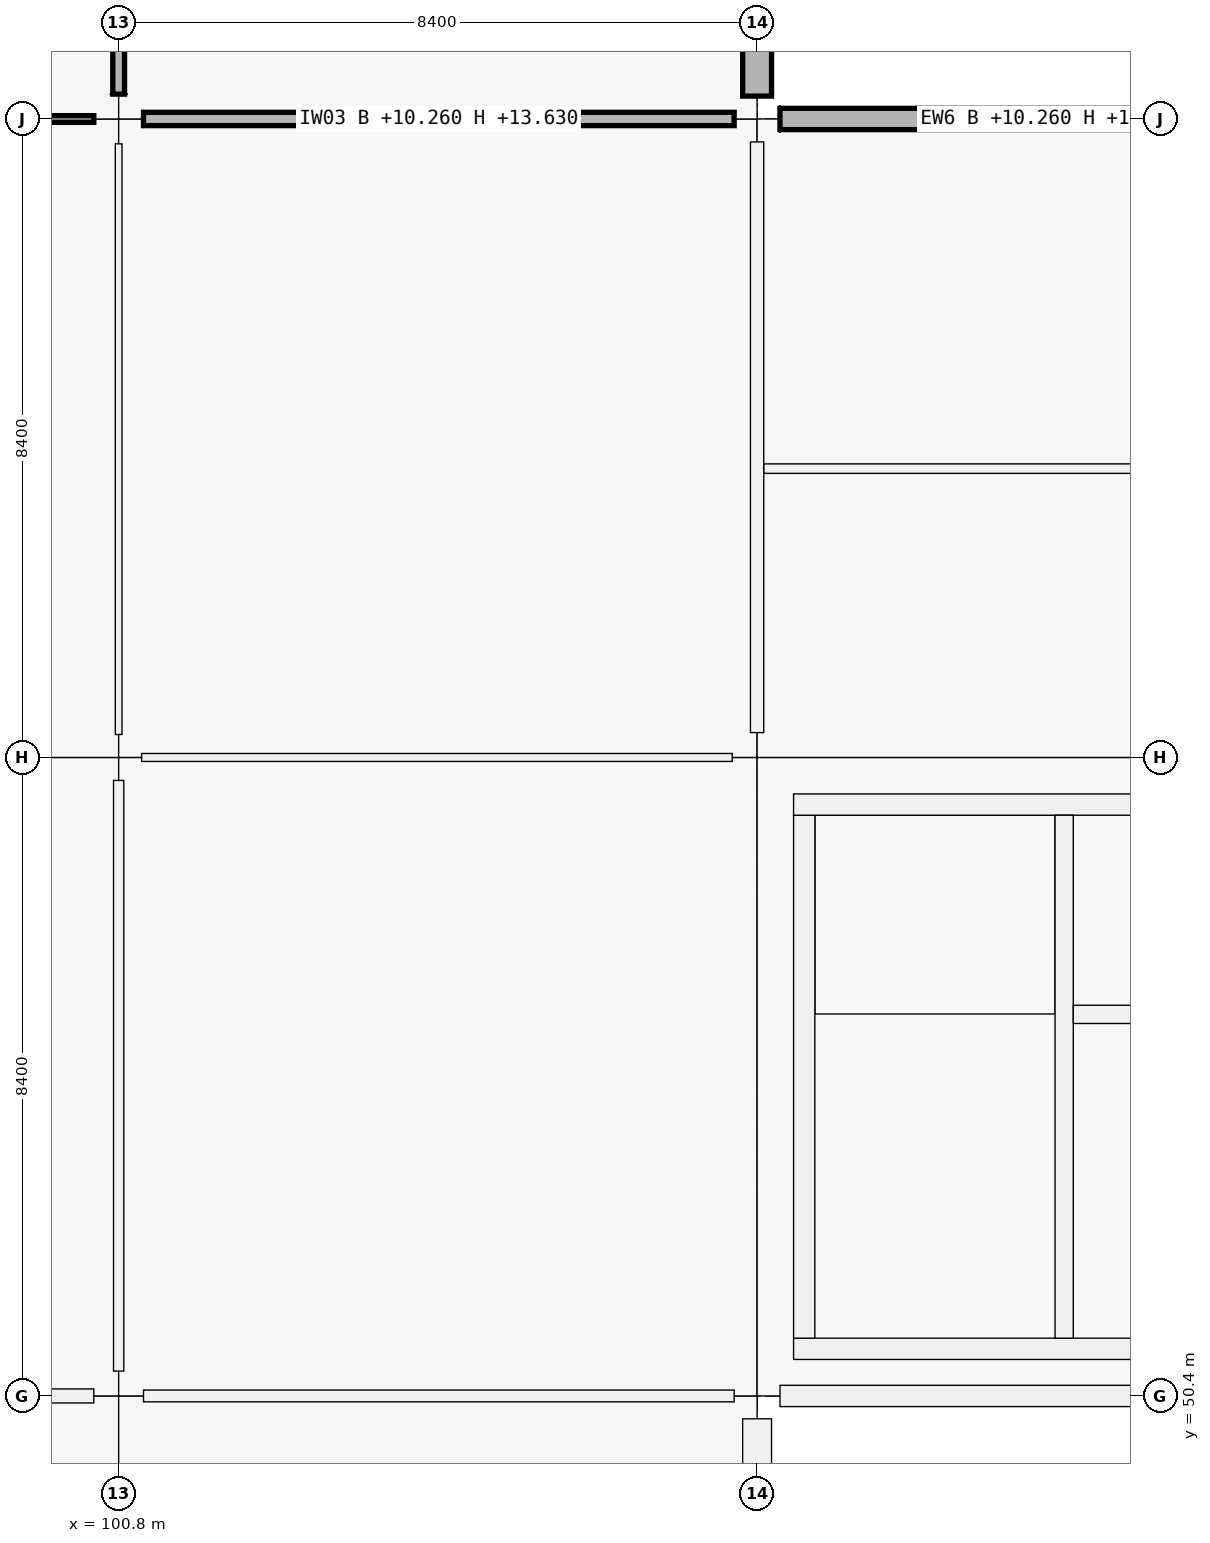
"""IFC4 building model, lengths in metres.
Left out: names, types, materials, properties, quantities, classifications, styles, units other than length and angle.
Written with IfcOpenShell. Run it as: python <this file> out.ifc"""

import sys

from ifc_helpers import new_model, si_unit, direction, frame, frame_2d, origin, origin_2d, place, context, subcontext, project, spatial, rectangle, extrude, element, fill, save


model = new_model("IFC4")
c1 = context("Model", 3, precision=1e-05, world=origin(), true_north=direction((0.0, 1.0)))
c2 = subcontext(c1, "Body", "Model", "MODEL_VIEW")
j1 = project(units=[si_unit("LENGTHUNIT", "METRE"), si_unit("PLANEANGLEUNIT", "RADIAN")], contexts=[c1])
p1 = place(None, origin())
s1 = spatial("IfcSite", under=j1, at=p1, CompositionType="ELEMENT")
p2 = place(p1, origin())
s2 = spatial("IfcBuilding", under=s1, at=p2, CompositionType="ELEMENT")
p3 = place(p2, frame((0.0, 0.0, 10.26)))
s3 = spatial("IfcBuildingStorey", under=s2, at=p3, CompositionType="ELEMENT", Elevation=10.26)
p4 = place(p3, frame((100.8, 50.4, 0.0), z_axis=(0.0, 0.0, 1.0), x_axis=(1.0, 0.0, 0.0)))
e1 = element("IfcColumn", 1, at=p4, inside=s3, PredefinedType="COLUMN", context=c2, shape_type="SweptSolid", body=[
    extrude(rectangle(XDim=0.65, YDim=0.65, at=origin_2d()), origin(), (0.0, 0.0, 1.0), 4.5),
])
p5 = place(p3, frame((100.8, 58.8, -0.3), z_axis=(0.0, 0.0, 1.0), x_axis=(1.0, 0.0, 0.0)))
e2 = element("IfcColumn", 2, at=p5, inside=s3, PredefinedType="COLUMN", context=c2, shape_type="SweptSolid", body=[
    extrude(rectangle(XDim=0.6, YDim=0.6, at=origin_2d()), origin(), (0.0, 0.0, 1.0), 4.8),
])
p6 = place(p3, frame((100.8, 67.2, 0.0), z_axis=(0.0, 0.0, 1.0), x_axis=(1.0, 0.0, 0.0)))
e3 = element("IfcColumn", 3, at=p6, inside=s3, PredefinedType="COLUMN", context=c2, shape_type="SweptSolid", body=[
    extrude(rectangle(XDim=0.65, YDim=0.65, at=origin_2d()), origin(), (0.0, 0.0, 1.0), 4.5),
])
p7 = place(p3, frame((109.2, 50.4, 0.0), z_axis=(0.0, 0.0, 1.0), x_axis=(1.0, 0.0, 0.0)))
e4 = element("IfcColumn", 4, at=p7, inside=s3, PredefinedType="COLUMN", context=c2, shape_type="SweptSolid", body=[
    extrude(rectangle(XDim=0.6, YDim=0.6, at=origin_2d()), origin(), (0.0, 0.0, 1.0), 4.5),
])
p8 = place(p3, frame((109.2, 58.8, 0.0), z_axis=(0.0, 0.0, 1.0), x_axis=(1.0, 0.0, 0.0)))
e5 = element("IfcColumn", 5, at=p8, inside=s3, PredefinedType="COLUMN", context=c2, shape_type="SweptSolid", body=[
    extrude(rectangle(XDim=0.65, YDim=0.65, at=origin_2d()), origin(), (0.0, 0.0, 1.0), 4.5),
])
p9 = place(p3, frame((109.2, 67.2, 0.0), z_axis=(0.0, 0.0, 1.0), x_axis=(1.0, 0.0, 0.0)))
e6 = element("IfcColumn", 6, at=p9, inside=s3, PredefinedType="COLUMN", context=c2, shape_type="SweptSolid", body=[
    extrude(rectangle(XDim=0.6, YDim=0.6, at=origin_2d()), origin(), (0.0, 0.0, 1.0), 4.5),
])
p10 = place(p3, frame((109.2, 50.099, 0.0), z_axis=(0.0, 0.0, 1.0), x_axis=(0.0, -1.0, 0.0)))
e7 = element("IfcWall", 7, at=p10, inside=s3, PredefinedType="SOLIDWALL", context=c2, shape_type="SweptSolid", body=[
    extrude(rectangle(XDim=7.773, YDim=0.38, at=frame_2d((3.887, 0.0))), origin(), (0.0, 0.0, 1.0), 3.54),
])
p11 = place(p3, frame((109.2, 75.274, 0.0), z_axis=(0.0, 0.0, 1.0), x_axis=(0.0, -1.0, 0.0)))
e8 = element("IfcWall", 8, at=p11, inside=s3, PredefinedType="SOLIDWALL", context=c2, shape_type="SweptSolid", body=[
    extrude(rectangle(XDim=7.773, YDim=0.38, at=frame_2d((3.886, 0.0))), origin(), (0.0, 0.0, 1.0), 3.54),
])
p12 = place(p3, frame((117.274, 50.4, 0.0), z_axis=(0.0, 0.0, 1.0), x_axis=(-1.0, 0.0, 0.0)))
e9 = element("IfcWall", 9, at=p12, inside=s3, PredefinedType="SOLIDWALL", context=c2, shape_type="SweptSolid", body=[
    extrude(rectangle(XDim=7.773, YDim=0.28, at=frame_2d((3.886, 0.0))), origin(), (0.0, 0.0, 1.0), 3.54),
])
p13 = place(p3, frame((109.501, 67.2, 0.0), z_axis=(0.0, 0.0, 1.0), x_axis=(1.0, 0.0, 0.0)))
e10 = element("IfcWall", 10, at=p13, inside=s3, PredefinedType="SOLIDWALL", context=c2, shape_type="SweptSolid", body=[
    extrude(rectangle(XDim=7.823, YDim=0.28, at=frame_2d((3.912, 0.0))), origin(), (0.0, 0.0, 1.0), 3.54),
])
p14 = place(p13, frame((2.837, 0.0, 0.9)))
e11 = element("IfcOpeningElement", 11, at=p14, cuts=e10, PredefinedType="OPENING", context=c2, shape_type="SweptSolid", body=[
    extrude(rectangle(XDim=2.15, YDim=1.95, at=frame_2d((1.075, 0.975))), frame((0.0, 0.14, 0.0), z_axis=(0.0, -1.0, 0.0), x_axis=(1.0, 0.0, 0.0)), (0.0, 0.0, 1.0), 0.28),
])
p15 = place(p3, frame((117.12, 51.02, 0.0), z_axis=(0.0, 0.0, 1.0), x_axis=(-1.0, 0.0, 0.0)))
e12 = element("IfcWall", 12, at=p15, inside=s3, PredefinedType="SHEAR", context=c2, shape_type="SweptSolid", body=[
    extrude(rectangle(XDim=7.44, YDim=0.28, at=frame_2d((3.72, 0.0))), origin(), (0.0, 0.0, 1.0), 4.5),
])
p16 = place(p3, frame((109.82, 51.16, 0.0), z_axis=(0.0, 0.0, 1.0), x_axis=(0.0, 1.0, 0.0)))
e13 = element("IfcWall", 13, at=p16, inside=s3, PredefinedType="SHEAR", context=c2, shape_type="SweptSolid", body=[
    extrude(rectangle(XDim=6.88, YDim=0.28, at=frame_2d((3.44, 0.0))), origin(), (0.0, 0.0, 1.0), 4.5),
])
p17 = place(p3, frame((109.68, 58.18, 0.0), z_axis=(0.0, 0.0, 1.0), x_axis=(1.0, 0.0, 0.0)))
e14 = element("IfcWall", 14, at=p17, inside=s3, PredefinedType="SHEAR", context=c2, shape_type="SweptSolid", body=[
    extrude(rectangle(XDim=7.44, YDim=0.28, at=frame_2d((3.72, 0.0))), origin(), (0.0, 0.0, 1.0), 4.5),
])
p18 = place(p3, frame((113.24, 51.16, 0.0), z_axis=(0.0, 0.0, 1.0), x_axis=(0.0, 1.0, 0.0)))
e15 = element("IfcWall", 15, at=p18, inside=s3, PredefinedType="SHEAR", context=c2, shape_type="SweptSolid", body=[
    extrude(rectangle(XDim=6.88, YDim=0.24, at=frame_2d((3.44, 0.0))), origin(), (0.0, 0.0, 1.0), 4.5),
])
p19 = place(p18, frame((0.12, 0.0, 0.0)))
e16 = element("IfcOpeningElement", 16, at=p19, cuts=e15, PredefinedType="OPENING", context=c2, shape_type="SweptSolid", body=[
    extrude(rectangle(XDim=1.0, YDim=2.15, at=frame_2d((0.5, 1.075))), frame((0.0, 0.12, 0.0), z_axis=(0.0, -1.0, 0.0), x_axis=(1.0, 0.0, 0.0)), (0.0, 0.0, 1.0), 0.24),
])
p20 = place(p3, frame((113.36, 55.42, 0.0), z_axis=(0.0, 0.0, 1.0), x_axis=(1.0, 0.0, 0.0)))
e17 = element("IfcWall", 17, at=p20, inside=s3, PredefinedType="SHEAR", context=c2, shape_type="SweptSolid", body=[
    extrude(rectangle(XDim=3.48, YDim=0.24, at=frame_2d((1.74, 0.0))), origin(), (0.0, 0.0, 1.0), 4.5),
])
p21 = place(p20, frame((1.19, 0.0, 0.0)))
e18 = element("IfcOpeningElement", 18, at=p21, cuts=e17, PredefinedType="OPENING", context=c2, shape_type="SweptSolid", body=[
    extrude(rectangle(XDim=1.1, YDim=2.15, at=frame_2d((0.55, 1.075))), frame((0.0, 0.12, 0.0), z_axis=(0.0, -1.0, 0.0), x_axis=(1.0, 0.0, 0.0)), (0.0, 0.0, 1.0), 0.24),
])
p22 = place(p3, frame((92.702, 50.4, 0.0), z_axis=(0.0, 0.0, 1.0), x_axis=(1.0, 0.0, 0.0)))
e19 = element("IfcWall", 19, at=p22, inside=s3, PredefinedType="PARTITIONING", context=c2, shape_type="SweptSolid", body=[
    extrude(rectangle(XDim=7.771, YDim=0.185, at=frame_2d((3.885, 0.0))), origin(), (0.0, 0.0, 1.0), 3.37),
])
p23 = place(p22, frame((3.035, 0.0, 0.0)))
e20 = element("IfcOpeningElement", 20, at=p23, cuts=e19, PredefinedType="OPENING", context=c2, shape_type="SweptSolid", body=[
    extrude(rectangle(XDim=1.7, YDim=2.35, at=frame_2d((0.85, 1.175))), frame((0.0, 0.093, 0.0), z_axis=(0.0, -1.0, 0.0), x_axis=(1.0, 0.0, 0.0)), (0.0, 0.0, 1.0), 0.185),
])
p24 = place(p3, frame((92.702, 67.2, 0.0), z_axis=(0.0, 0.0, 1.0), x_axis=(1.0, 0.0, 0.0)))
e21 = element("IfcWall", 21, at=p24, inside=s3, PredefinedType="PARTITIONING", context=c2, shape_type="SweptSolid", body=[
    extrude(rectangle(XDim=7.771, YDim=0.088, at=frame_2d((3.885, 0.0))), origin(), (0.0, 0.0, 1.0), 3.37),
])
p25 = place(p24, frame((3.085, 0.0, 0.0)))
e22 = element("IfcOpeningElement", 22, at=p25, cuts=e21, PredefinedType="OPENING", context=c2, shape_type="SweptSolid", body=[
    extrude(rectangle(XDim=1.6, YDim=2.3, at=frame_2d((0.8, 1.15))), frame((0.0, 0.044, 0.0), z_axis=(0.0, -1.0, 0.0), x_axis=(1.0, 0.0, 0.0)), (0.0, 0.0, 1.0), 0.088),
])
p26 = place(p3, frame((101.127, 50.4, 0.0), z_axis=(0.0, 0.0, 1.0), x_axis=(1.0, 0.0, 0.0)))
e23 = element("IfcWall", 23, at=p26, inside=s3, PredefinedType="PARTITIONING", context=c2, shape_type="SweptSolid", body=[
    extrude(rectangle(XDim=7.771, YDim=0.155, at=frame_2d((3.885, 0.0))), origin(), (0.0, 0.0, 1.0), 3.37),
])
p27 = place(p26, frame((3.135, 0.0, 0.0)))
e24 = element("IfcOpeningElement", 24, at=p27, cuts=e23, PredefinedType="OPENING", context=c2, shape_type="SweptSolid", body=[
    extrude(rectangle(XDim=1.5, YDim=2.25, at=frame_2d((0.75, 1.125))), frame((0.0, 0.078, 0.0), z_axis=(0.0, -1.0, 0.0), x_axis=(1.0, 0.0, 0.0)), (0.0, 0.0, 1.0), 0.155),
])
p28 = place(p3, frame((101.102, 58.8, 0.0), z_axis=(0.0, 0.0, 1.0), x_axis=(1.0, 0.0, 0.0)))
e25 = element("IfcWall", 25, at=p28, inside=s3, PredefinedType="PARTITIONING", context=c2, shape_type="SweptSolid", body=[
    extrude(rectangle(XDim=7.771, YDim=0.105, at=frame_2d((3.885, 0.0))), origin(), (0.0, 0.0, 1.0), 3.37),
])
p29 = place(p28, frame((3.16, 0.0, 0.0)))
e26 = element("IfcOpeningElement", 26, at=p29, cuts=e25, PredefinedType="OPENING", context=c2, shape_type="SweptSolid", body=[
    extrude(rectangle(XDim=1.45, YDim=2.2, at=frame_2d((0.725, 1.1))), frame((0.0, 0.052, 0.0), z_axis=(0.0, -1.0, 0.0), x_axis=(1.0, 0.0, 0.0)), (0.0, 0.0, 1.0), 0.105),
])
p30 = place(p3, frame((101.127, 67.2, 0.0), z_axis=(0.0, 0.0, 1.0), x_axis=(1.0, 0.0, 0.0)))
e27 = element("IfcWall", 27, at=p30, inside=s3, PredefinedType="PARTITIONING", context=c2, shape_type="SweptSolid", body=[
    extrude(rectangle(XDim=7.771, YDim=0.175, at=frame_2d((3.885, 0.0))), origin(), (0.0, 0.0, 1.0), 3.37),
])
p31 = place(p30, frame((3.186, 0.0, 0.0)))
e28 = element("IfcOpeningElement", 28, at=p31, cuts=e27, PredefinedType="OPENING", context=c2, shape_type="SweptSolid", body=[
    extrude(rectangle(XDim=1.4, YDim=2.25, at=frame_2d((0.7, 1.125))), frame((0.0, 0.087, 0.0), z_axis=(0.0, -1.0, 0.0), x_axis=(1.0, 0.0, 0.0)), (0.0, 0.0, 1.0), 0.175),
])
p32 = place(p3, frame((100.8, 50.727, 0.0), z_axis=(0.0, 0.0, 1.0), x_axis=(0.0, 1.0, 0.0)))
e29 = element("IfcWall", 29, at=p32, inside=s3, PredefinedType="PARTITIONING", context=c2, shape_type="SweptSolid", body=[
    extrude(rectangle(XDim=7.771, YDim=0.135, at=frame_2d((3.885, 0.0))), origin(), (0.0, 0.0, 1.0), 3.37),
])
p33 = place(p32, frame((3.035, 0.0, 0.0)))
e30 = element("IfcOpeningElement", 30, at=p33, cuts=e29, PredefinedType="OPENING", context=c2, shape_type="SweptSolid", body=[
    extrude(rectangle(XDim=1.7, YDim=2.35, at=frame_2d((0.85, 1.175))), frame((0.0, 0.067, 0.0), z_axis=(0.0, -1.0, 0.0), x_axis=(1.0, 0.0, 0.0)), (0.0, 0.0, 1.0), 0.135),
])
p34 = place(p3, frame((100.8, 59.102, 0.0), z_axis=(0.0, 0.0, 1.0), x_axis=(0.0, 1.0, 0.0)))
e31 = element("IfcWall", 31, at=p34, inside=s3, PredefinedType="PARTITIONING", context=c2, shape_type="SweptSolid", body=[
    extrude(rectangle(XDim=7.771, YDim=0.088, at=frame_2d((3.885, 0.0))), origin(), (0.0, 0.0, 1.0), 3.37),
])
p35 = place(p34, frame((3.085, 0.0, 0.0)))
e32 = element("IfcOpeningElement", 32, at=p35, cuts=e31, PredefinedType="OPENING", context=c2, shape_type="SweptSolid", body=[
    extrude(rectangle(XDim=1.6, YDim=2.3, at=frame_2d((0.8, 1.15))), frame((0.0, 0.044, 0.0), z_axis=(0.0, -1.0, 0.0), x_axis=(1.0, 0.0, 0.0)), (0.0, 0.0, 1.0), 0.088),
])
p36 = place(p3, frame((100.8, 67.527, 0.0), z_axis=(0.0, 0.0, 1.0), x_axis=(0.0, 1.0, 0.0)))
e33 = element("IfcWall", 33, at=p36, inside=s3, PredefinedType="PARTITIONING", context=c2, shape_type="SweptSolid", body=[
    extrude(rectangle(XDim=7.771, YDim=0.155, at=frame_2d((3.885, 0.0))), origin(), (0.0, 0.0, 1.0), 3.37),
])
p37 = place(p36, frame((3.401, 0.0, 0.0)))
e34 = element("IfcOpeningElement", 34, at=p37, cuts=e33, PredefinedType="OPENING", context=c2, shape_type="SweptSolid", body=[
    extrude(rectangle(XDim=0.97, YDim=2.12, at=frame_2d((0.485, 1.06))), frame((0.0, 0.078, 0.0), z_axis=(0.0, -1.0, 0.0), x_axis=(1.0, 0.0, 0.0)), (0.0, 0.0, 1.0), 0.155),
])
p38 = place(p3, frame((109.2, 59.127, 0.0), z_axis=(0.0, 0.0, 1.0), x_axis=(0.0, 1.0, 0.0)))
e35 = element("IfcWall", 35, at=p38, inside=s3, PredefinedType="PARTITIONING", context=c2, shape_type="SweptSolid", body=[
    extrude(rectangle(XDim=7.771, YDim=0.175, at=frame_2d((3.885, 0.0))), origin(), (0.0, 0.0, 1.0), 3.37),
])
p39 = place(p3, frame((109.29, 62.6, 0.0), z_axis=(0.0, 0.0, 1.0), x_axis=(1.0, 0.0, 0.0)))
e36 = element("IfcWall", 36, at=p39, inside=s3, PredefinedType="PARTITIONING", context=c2, shape_type="SweptSolid", body=[
    extrude(rectangle(XDim=8.236, YDim=0.125, at=frame_2d((4.118, 0.0))), origin(), (0.0, 0.0, 1.0), 3.37),
])
p40 = place(p14, origin())
e37 = element("IfcWindow", 37, at=p40, inside=s3, PartitioningType="SINGLE_PANEL", PredefinedType="WINDOW", context=c2, shape_type="SweptSolid", body=[
    extrude(rectangle(XDim=2.15, YDim=1.95, at=frame_2d((1.075, 0.975))), frame((0.0, 0.03, 0.0), z_axis=(0.0, -1.0, 0.0), x_axis=(1.0, 0.0, 0.0)), (0.0, 0.0, 1.0), 0.06),
])
fill(e11, e37)
p41 = place(p19, origin())
e38 = element("IfcDoor", 38, at=p41, inside=s3, OperationType="SINGLE_SWING_LEFT", PredefinedType="DOOR", context=c2, shape_type="SweptSolid", body=[
    extrude(rectangle(XDim=1.0, YDim=2.15, at=frame_2d((0.5, 1.075))), frame((0.0, 0.025, 0.0), z_axis=(0.0, -1.0, 0.0), x_axis=(1.0, 0.0, 0.0)), (0.0, 0.0, 1.0), 0.05),
])
fill(e16, e38)
p42 = place(p27, origin())
e39 = element("IfcDoor", 39, at=p42, inside=s3, OperationType="DOUBLE_DOOR_SINGLE_SWING", PredefinedType="DOOR", context=c2, shape_type="SweptSolid", body=[
    extrude(rectangle(XDim=1.5, YDim=2.25, at=frame_2d((0.75, 1.125))), frame((0.0, 0.025, 0.0), z_axis=(0.0, -1.0, 0.0), x_axis=(1.0, 0.0, 0.0)), (0.0, 0.0, 1.0), 0.05),
])
fill(e24, e39)
p43 = place(p29, origin())
e40 = element("IfcDoor", 40, at=p43, inside=s3, OperationType="DOUBLE_DOOR_SINGLE_SWING", PredefinedType="DOOR", context=c2, shape_type="SweptSolid", body=[
    extrude(rectangle(XDim=1.45, YDim=2.2, at=frame_2d((0.725, 1.1))), frame((0.0, 0.025, 0.0), z_axis=(0.0, -1.0, 0.0), x_axis=(1.0, 0.0, 0.0)), (0.0, 0.0, 1.0), 0.05),
])
fill(e26, e40)
p44 = place(p31, origin())
e41 = element("IfcDoor", 41, at=p44, inside=s3, OperationType="DOUBLE_DOOR_SINGLE_SWING", PredefinedType="DOOR", context=c2, shape_type="SweptSolid", body=[
    extrude(rectangle(XDim=1.4, YDim=2.25, at=frame_2d((0.7, 1.125))), frame((0.0, 0.025, 0.0), z_axis=(0.0, -1.0, 0.0), x_axis=(1.0, 0.0, 0.0)), (0.0, 0.0, 1.0), 0.05),
])
fill(e28, e41)
p45 = place(p33, origin())
e42 = element("IfcDoor", 42, at=p45, inside=s3, OperationType="DOUBLE_DOOR_SINGLE_SWING", PredefinedType="DOOR", context=c2, shape_type="SweptSolid", body=[
    extrude(rectangle(XDim=1.7, YDim=2.35, at=frame_2d((0.85, 1.175))), frame((0.0, 0.025, 0.0), z_axis=(0.0, -1.0, 0.0), x_axis=(1.0, 0.0, 0.0)), (0.0, 0.0, 1.0), 0.05),
])
fill(e30, e42)
p46 = place(p35, origin())
e43 = element("IfcDoor", 43, at=p46, inside=s3, OperationType="DOUBLE_DOOR_SINGLE_SWING", PredefinedType="DOOR", context=c2, shape_type="SweptSolid", body=[
    extrude(rectangle(XDim=1.6, YDim=2.3, at=frame_2d((0.8, 1.15))), frame((0.0, 0.025, 0.0), z_axis=(0.0, -1.0, 0.0), x_axis=(1.0, 0.0, 0.0)), (0.0, 0.0, 1.0), 0.05),
])
fill(e32, e43)
save(model, sys.argv[1])
